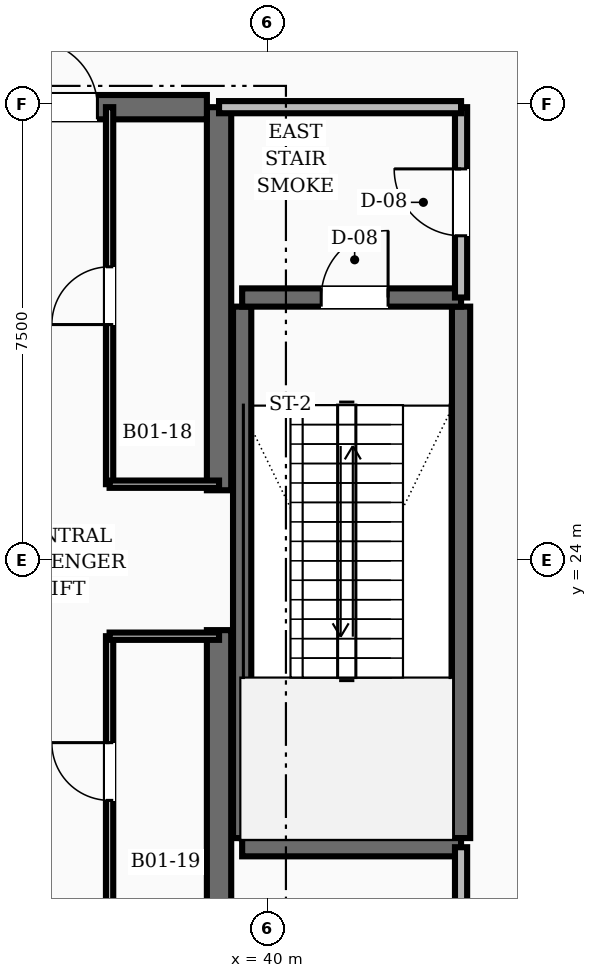
"""IFC4 building model, lengths in metres.
Left out: names, types, materials, properties, quantities, classifications, styles, units other than length and angle.
Written with IfcOpenShell. Run it as: python <this file> out.ifc"""

import sys

from ifc_helpers import new_model, si_unit, direction, frame, frame_2d, origin, place, context, subcontext, project, spatial, rectangle, extrude, element, fill, save


model = new_model("IFC4")
c1 = context("Model", 3, precision=1e-05, world=origin(), true_north=direction((0.0, 1.0)))
c2 = subcontext(c1, "Body", "Model", "MODEL_VIEW")
j1 = project(units=[si_unit("LENGTHUNIT", "METRE"), si_unit("PLANEANGLEUNIT", "RADIAN")], contexts=[c1])
p1 = place(None, origin())
s1 = spatial("IfcSite", under=j1, at=p1, CompositionType="ELEMENT")
p2 = place(p1, origin())
s2 = spatial("IfcBuilding", under=s1, at=p2, CompositionType="ELEMENT")
p3 = place(p2, frame((0.0, 0.0, -5.2)))
s3 = spatial("IfcBuildingStorey", under=s2, at=p3, CompositionType="ELEMENT", Elevation=-5.2)
for number, where, z_axis, x_axis in (
    (1, (39.2, 16.55, 0.0), (0.0, 0.0, 1.0), (0.0, 1.0, 0.0)),
    (2, (39.2, 25.15, 0.0), (0.0, 0.0, 1.0), (0.0, 1.0, 0.0)),
):
    element("IfcWall", number, at=place(p3, frame(where, z_axis=z_axis, x_axis=x_axis)), inside=s3, PredefinedType="SHEAR", context=c2, shape_type="SweptSolid", body=[
        extrude(rectangle(XDim=6.3, YDim=0.4, at=frame_2d((3.15, 0.0))), origin(), (0.0, 0.0, 1.0), 5.2),
    ])
p4 = place(p3, frame((35.8, 31.45, 0.0), z_axis=(0.0, 0.0, 1.0), x_axis=(1.0, 0.0, 0.0)))
e3 = element("IfcWall", 3, at=p4, inside=s3, PredefinedType="SHEAR", context=c2, shape_type="SweptSolid", body=[
    extrude(rectangle(XDim=3.2, YDim=0.4, at=frame_2d((1.6, 0.0))), origin(), (0.0, 0.0, 1.0), 5.2),
])
p5 = place(p4, frame((0.3, 0.0, 0.0)))
e4 = element("IfcOpeningElement", 4, at=p5, cuts=e3, PredefinedType="OPENING", context=c2, shape_type="SweptSolid", body=[
    extrude(rectangle(XDim=1.1, YDim=2.1, at=frame_2d((0.55, 1.05))), frame((0.0, 0.21, 0.0), z_axis=(0.0, -1.0, 0.0), x_axis=(1.0, 0.0, 0.0)), (0.0, 0.0, 1.0), 0.42),
])
for number, where, z_axis, x_axis in (
    (5, (43.18, 19.43, 0.0), (0.0, 0.0, 1.0), (0.0, 1.0, 0.0)),
    (6, (39.58, 19.43, 0.0), (0.0, 0.0, 1.0), (0.0, 1.0, 0.0)),
):
    element("IfcWall", number, at=place(p3, frame(where, z_axis=z_axis, x_axis=x_axis)), inside=s3, PredefinedType="SHEAR", context=c2, shape_type="SweptSolid", body=[
        extrude(rectangle(XDim=8.74, YDim=0.3, at=frame_2d((4.37, 0.0))), origin(), (0.0, 0.0, 1.0), 5.2),
    ])
p6 = place(p3, frame((39.58, 19.28, 0.0), z_axis=(0.0, 0.0, 1.0), x_axis=(1.0, 0.0, 0.0)))
e7 = element("IfcWall", 7, at=p6, inside=s3, PredefinedType="SHEAR", context=c2, shape_type="SweptSolid", body=[
    extrude(rectangle(XDim=3.6, YDim=0.3, at=frame_2d((1.8, 0.0))), origin(), (0.0, 0.0, 1.0), 5.2),
])
p7 = place(p3, frame((39.58, 28.32, 0.0), z_axis=(0.0, 0.0, 1.0), x_axis=(1.0, 0.0, 0.0)))
e8 = element("IfcWall", 8, at=p7, inside=s3, PredefinedType="SHEAR", context=c2, shape_type="SweptSolid", body=[
    extrude(rectangle(XDim=3.6, YDim=0.3, at=frame_2d((1.8, 0.0))), origin(), (0.0, 0.0, 1.0), 5.2),
])
p8 = place(p7, frame((1.3, 0.0, 0.0)))
e9 = element("IfcOpeningElement", 9, at=p8, cuts=e8, PredefinedType="OPENING", context=c2, shape_type="SweptSolid", body=[
    extrude(rectangle(XDim=1.1, YDim=2.1, at=frame_2d((0.55, 1.05))), frame((0.0, 0.16, 0.0), z_axis=(0.0, -1.0, 0.0), x_axis=(1.0, 0.0, 0.0)), (0.0, 0.0, 1.0), 0.32),
])
p9 = place(p3, frame((43.18, 28.32, 0.0), z_axis=(0.0, 0.0, 1.0), x_axis=(0.0, 1.0, 0.0)))
e10 = element("IfcWall", 10, at=p9, inside=s3, PredefinedType="SOLIDWALL", context=c2, shape_type="SweptSolid", body=[
    extrude(rectangle(XDim=3.13, YDim=0.2, at=frame_2d((1.565, 0.0))), origin(), (0.0, 0.0, 1.0), 3.92),
])
p10 = place(p9, frame((1.015, 0.0, 0.0)))
e11 = element("IfcOpeningElement", 11, at=p10, cuts=e10, PredefinedType="OPENING", context=c2, shape_type="SweptSolid", body=[
    extrude(rectangle(XDim=1.1, YDim=2.1, at=frame_2d((0.55, 1.05))), frame((0.0, 0.11, 0.0), z_axis=(0.0, -1.0, 0.0), x_axis=(1.0, 0.0, 0.0)), (0.0, 0.0, 1.0), 0.22),
])
p11 = place(p3, frame((39.2, 31.45, 0.0), z_axis=(0.0, 0.0, 1.0), x_axis=(1.0, 0.0, 0.0)))
e12 = element("IfcWall", 12, at=p11, inside=s3, PredefinedType="SOLIDWALL", context=c2, shape_type="SweptSolid", body=[
    extrude(rectangle(XDim=3.98, YDim=0.2, at=frame_2d((1.99, 0.0))), origin(), (0.0, 0.0, 1.0), 3.92),
])
p12 = place(p3, frame((43.18, 16.55, 0.0), z_axis=(0.0, 0.0, 1.0), x_axis=(0.0, 1.0, 0.0)))
e13 = element("IfcWall", 13, at=p12, inside=s3, PredefinedType="SOLIDWALL", context=c2, shape_type="SweptSolid", body=[
    extrude(rectangle(XDim=2.73, YDim=0.2, at=frame_2d((1.365, 0.0))), origin(), (0.0, 0.0, 1.0), 3.92),
])
p13 = place(p12, frame((0.89, 0.0, 0.0)))
e14 = element("IfcOpeningElement", 14, at=p13, cuts=e13, PredefinedType="OPENING", context=c2, shape_type="SweptSolid", body=[
    extrude(rectangle(XDim=0.95, YDim=2.1, at=frame_2d((0.475, 1.05))), frame((0.0, 0.11, 0.0), z_axis=(0.0, -1.0, 0.0), x_axis=(1.0, 0.0, 0.0)), (0.0, 0.0, 1.0), 0.22),
])
p14 = place(p3, frame((37.4, 25.25, 0.0), z_axis=(0.0, 0.0, 1.0), x_axis=(0.0, 1.0, 0.0)))
e15 = element("IfcWall", 15, at=p14, inside=s3, PredefinedType="PARTITIONING", context=c2, shape_type="SweptSolid", body=[
    extrude(rectangle(XDim=6.2, YDim=0.12, at=frame_2d((3.1, 0.0))), origin(), (0.0, 0.0, 1.0), 3.92),
])
p15 = place(p14, frame((2.625, 0.0, 0.0)))
e16 = element("IfcOpeningElement", 16, at=p15, cuts=e15, PredefinedType="OPENING", context=c2, shape_type="SweptSolid", body=[
    extrude(rectangle(XDim=0.95, YDim=2.1, at=frame_2d((0.475, 1.05))), frame((0.0, 0.07, 0.0), z_axis=(0.0, -1.0, 0.0), x_axis=(1.0, 0.0, 0.0)), (0.0, 0.0, 1.0), 0.14),
])
p16 = place(p3, frame((37.4, 25.25, 0.0), z_axis=(0.0, 0.0, 1.0), x_axis=(1.0, 0.0, 0.0)))
e17 = element("IfcWall", 17, at=p16, inside=s3, PredefinedType="PARTITIONING", context=c2, shape_type="SweptSolid", body=[
    extrude(rectangle(XDim=1.8, YDim=0.12, at=frame_2d((0.9, 0.0))), origin(), (0.0, 0.0, 1.0), 3.92),
])
p17 = place(p3, frame((37.4, 18.3, 0.0), z_axis=(0.0, 0.0, 1.0), x_axis=(0.0, 1.0, 0.0)))
e18 = element("IfcWall", 18, at=p17, inside=s3, PredefinedType="PARTITIONING", context=c2, shape_type="SweptSolid", body=[
    extrude(rectangle(XDim=4.45, YDim=0.12, at=frame_2d((2.225, 0.0))), origin(), (0.0, 0.0, 1.0), 3.92),
])
p18 = place(p17, frame((1.75, 0.0, 0.0)))
e19 = element("IfcOpeningElement", 19, at=p18, cuts=e18, PredefinedType="OPENING", context=c2, shape_type="SweptSolid", body=[
    extrude(rectangle(XDim=0.95, YDim=2.1, at=frame_2d((0.475, 1.05))), frame((0.0, 0.07, 0.0), z_axis=(0.0, -1.0, 0.0), x_axis=(1.0, 0.0, 0.0)), (0.0, 0.0, 1.0), 0.14),
])
p19 = place(p3, frame((37.4, 22.75, 0.0), z_axis=(0.0, 0.0, 1.0), x_axis=(1.0, 0.0, 0.0)))
e20 = element("IfcWall", 20, at=p19, inside=s3, PredefinedType="PARTITIONING", context=c2, shape_type="SweptSolid", body=[
    extrude(rectangle(XDim=1.8, YDim=0.12, at=frame_2d((0.9, 0.0))), origin(), (0.0, 0.0, 1.0), 3.92),
])
p20 = place(p8, origin())
e21 = element("IfcDoor", 21, at=p20, inside=s3, OperationType="SINGLE_SWING_RIGHT", PredefinedType="DOOR", context=c2, shape_type="SweptSolid", body=[
    extrude(rectangle(XDim=1.1, YDim=2.1, at=frame_2d((0.55, 1.05))), frame((0.0, 0.025, 0.0), z_axis=(0.0, -1.0, 0.0), x_axis=(1.0, 0.0, 0.0)), (0.0, 0.0, 1.0), 0.05),
])
fill(e9, e21)
p21 = place(p10, origin())
e22 = element("IfcDoor", 22, at=p21, inside=s3, OperationType="SINGLE_SWING_RIGHT", PredefinedType="DOOR", context=c2, shape_type="SweptSolid", body=[
    extrude(rectangle(XDim=1.1, YDim=2.1, at=frame_2d((0.55, 1.05))), frame((0.0, 0.025, 0.0), z_axis=(0.0, -1.0, 0.0), x_axis=(1.0, 0.0, 0.0)), (0.0, 0.0, 1.0), 0.05),
])
fill(e11, e22)
p22 = place(p5, origin())
e23 = element("IfcDoor", 23, at=p22, inside=s3, OperationType="SINGLE_SWING_LEFT", PredefinedType="DOOR", context=c2, shape_type="SweptSolid", body=[
    extrude(rectangle(XDim=1.1, YDim=2.1, at=frame_2d((0.55, 1.05))), frame((0.0, 0.025, 0.0), z_axis=(0.0, -1.0, 0.0), x_axis=(1.0, 0.0, 0.0)), (0.0, 0.0, 1.0), 0.05),
])
fill(e4, e23)
p23 = place(p15, origin())
e24 = element("IfcDoor", 24, at=p23, inside=s3, OperationType="SINGLE_SWING_LEFT", PredefinedType="DOOR", context=c2, shape_type="SweptSolid", body=[
    extrude(rectangle(XDim=0.95, YDim=2.1, at=frame_2d((0.475, 1.05))), frame((0.0, 0.025, 0.0), z_axis=(0.0, -1.0, 0.0), x_axis=(1.0, 0.0, 0.0)), (0.0, 0.0, 1.0), 0.05),
])
fill(e16, e24)
p24 = place(p18, origin())
e25 = element("IfcDoor", 25, at=p24, inside=s3, OperationType="SINGLE_SWING_RIGHT", PredefinedType="DOOR", context=c2, shape_type="SweptSolid", body=[
    extrude(rectangle(XDim=0.95, YDim=2.1, at=frame_2d((0.475, 1.05))), frame((0.0, 0.025, 0.0), z_axis=(0.0, -1.0, 0.0), x_axis=(1.0, 0.0, 0.0)), (0.0, 0.0, 1.0), 0.05),
])
fill(e19, e25)
save(model, sys.argv[1])
